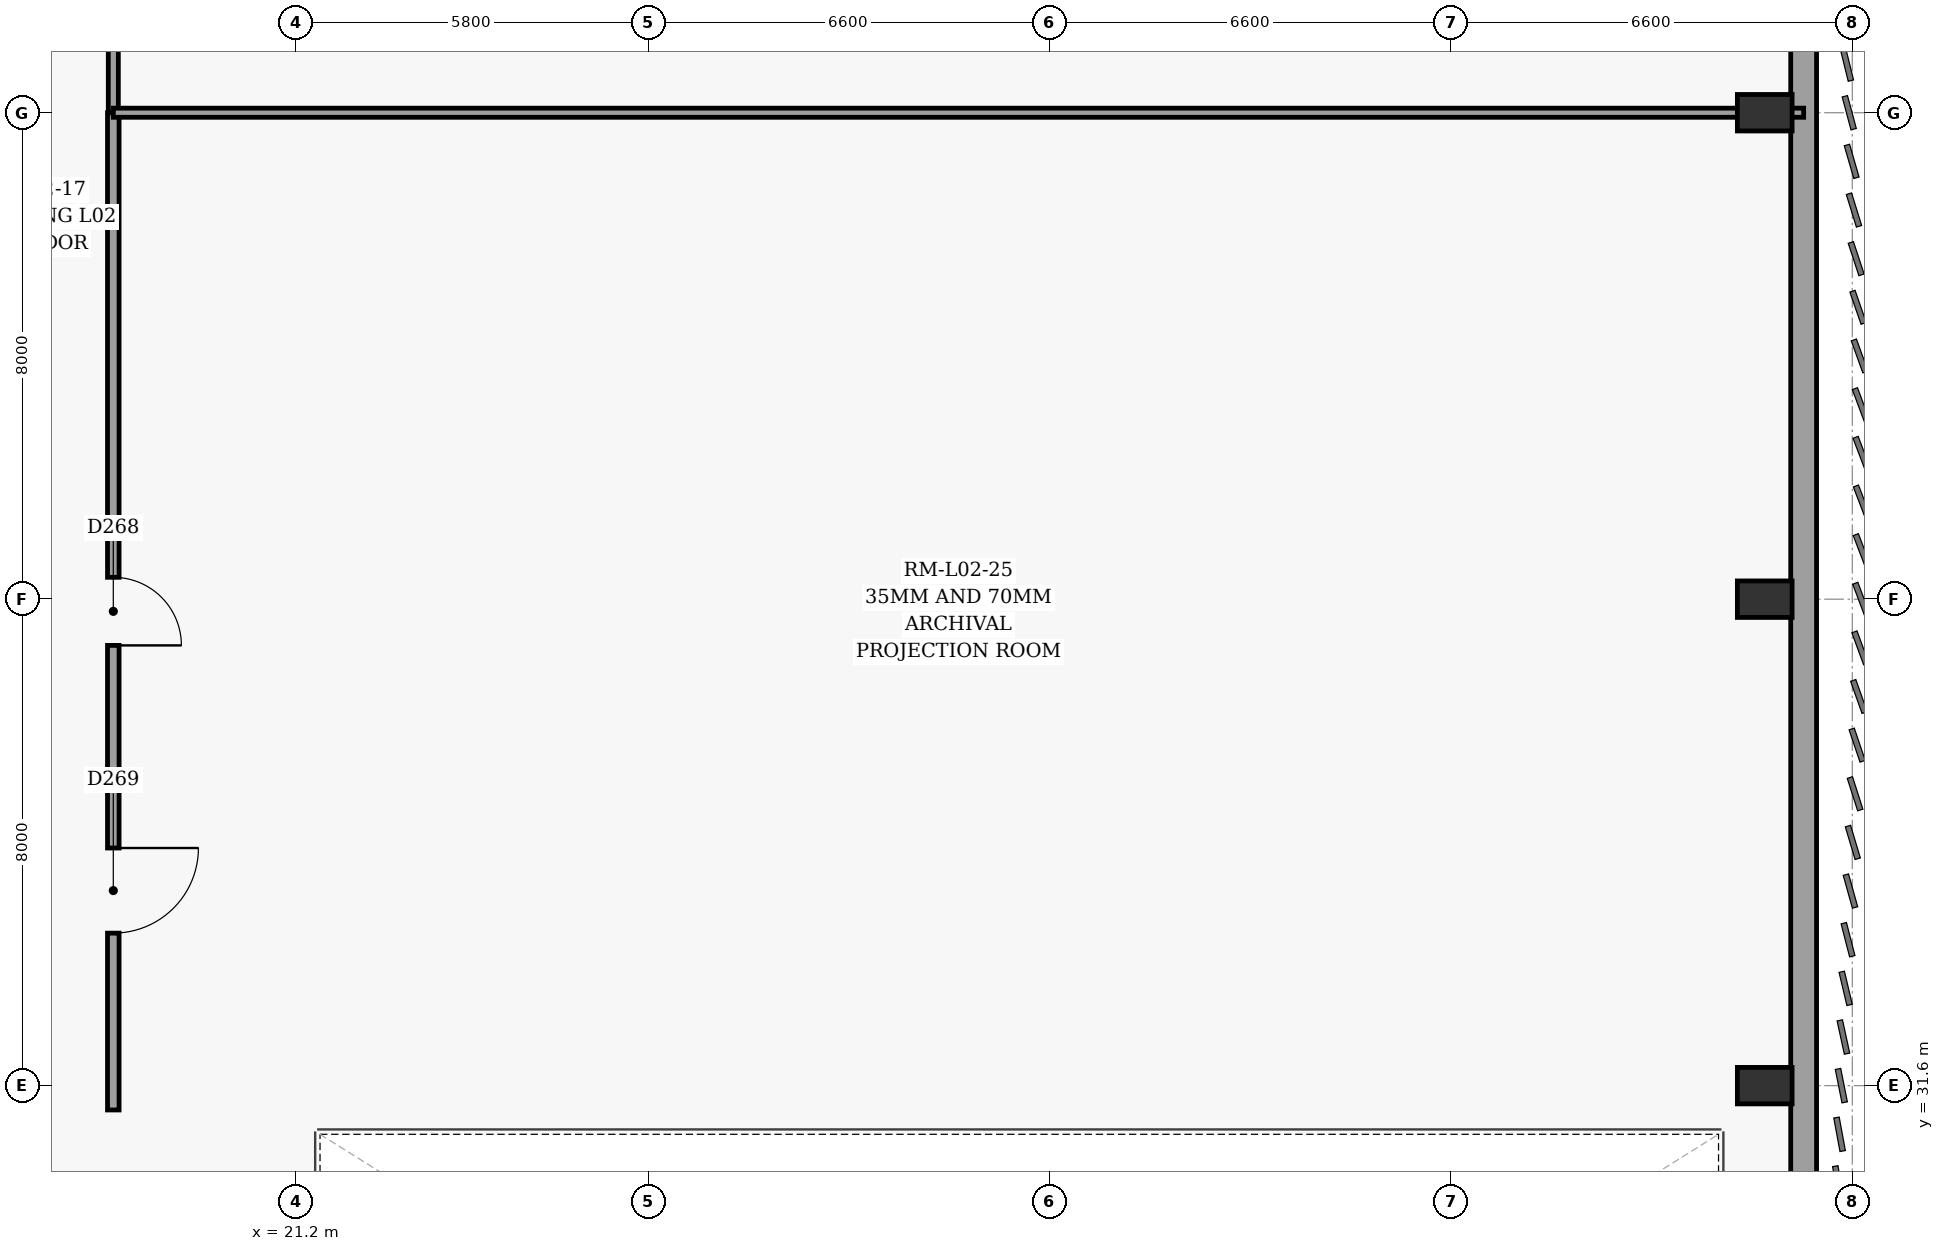
"""IFC4 building model, lengths in metres.
Left out: names, types, materials, properties, quantities, classifications, styles, units other than length and angle.
Written with IfcOpenShell. Run it as: python <this file> out.ifc"""

import sys

from ifc_helpers import new_model, si_unit, direction, frame, frame_2d, origin, origin_2d, place, context, subcontext, project, spatial, rectangle, extrude, element, fill, save


model = new_model("IFC4")
c1 = context("Model", 3, precision=1e-05, world=origin(), true_north=direction((0.0, 1.0)))
c2 = subcontext(c1, "Body", "Model", "MODEL_VIEW")
j1 = project(units=[si_unit("LENGTHUNIT", "METRE"), si_unit("PLANEANGLEUNIT", "RADIAN")], contexts=[c1])
p1 = place(None, origin())
s1 = spatial("IfcSite", under=j1, at=p1, CompositionType="ELEMENT")
p2 = place(p1, origin())
s2 = spatial("IfcBuilding", under=s1, at=p2, CompositionType="ELEMENT")
p3 = place(p2, frame((0.0, 0.0, 10.2)))
s3 = spatial("IfcBuildingStorey", under=s2, at=p3, CompositionType="ELEMENT", Elevation=10.2)
for number, where, z_axis, x_axis in (
    (1, (45.36, 31.6, 0.0), (0.0, 0.0, 1.0), (1.0, 0.0, 0.0)),
    (2, (45.36, 39.6, 0.0), (0.0, 0.0, 1.0), (1.0, 0.0, 0.0)),
    (3, (45.36, 47.6, 0.0), (0.0, 0.0, 1.0), (1.0, 0.0, 0.0)),
):
    element("IfcColumn", number, at=place(p3, frame(where, z_axis=z_axis, x_axis=x_axis)), inside=s3, PredefinedType="COLUMN", context=c2, shape_type="SweptSolid", body=[
        extrude(rectangle(XDim=0.6, YDim=0.9, at=origin_2d()), origin(), (0.0, 0.0, 1.0), 5.4),
    ])
p4 = place(p3, frame((46.0, 63.46, 0.0), z_axis=(0.0, 0.0, 1.0), x_axis=(0.0, -1.0, 0.0)))
e4 = element("IfcWall", 4, at=p4, inside=s3, PredefinedType="SOLIDWALL", context=c2, shape_type="SweptSolid", body=[
    extrude(rectangle(XDim=55.72, YDim=0.425, at=frame_2d((27.86, 0.0))), origin(), (0.0, 0.0, 1.0), 5.16),
])
p5 = place(p3, frame((18.2, 47.6, 0.0), z_axis=(0.0, 0.0, 1.0), x_axis=(0.0, -1.0, 0.0)))
e5 = element("IfcWall", 5, at=p5, inside=s3, PredefinedType="PARTITIONING", context=c2, shape_type="SweptSolid", body=[
    extrude(rectangle(XDim=16.4, YDim=0.19, at=frame_2d((8.2, 0.0))), origin(), (0.0, 0.0, 1.0), 5.16),
])
p6 = place(p5, frame((7.64, 0.0, 0.0)))
e6 = element("IfcOpeningElement", 6, at=p6, cuts=e5, PredefinedType="OPENING", context=c2, shape_type="SweptSolid", body=[
    extrude(rectangle(XDim=1.12, YDim=2.15, at=frame_2d((0.56, 1.075))), frame((0.0, 0.105, 0.0), z_axis=(0.0, -1.0, 0.0), x_axis=(1.0, 0.0, 0.0)), (0.0, 0.0, 1.0), 0.21),
])
p7 = place(p5, frame((12.092, 0.0, 0.0)))
e7 = element("IfcOpeningElement", 7, at=p7, cuts=e5, PredefinedType="OPENING", context=c2, shape_type="SweptSolid", body=[
    extrude(rectangle(XDim=1.4, YDim=2.25, at=frame_2d((0.7, 1.125))), frame((0.0, 0.105, 0.0), z_axis=(0.0, -1.0, 0.0), x_axis=(1.0, 0.0, 0.0)), (0.0, 0.0, 1.0), 0.21),
])
p8 = place(p3, frame((18.2, 63.6, 0.0), z_axis=(0.0, 0.0, 1.0), x_axis=(0.0, -1.0, 0.0)))
e8 = element("IfcWall", 8, at=p8, inside=s3, PredefinedType="PARTITIONING", context=c2, shape_type="SweptSolid", body=[
    extrude(rectangle(XDim=16.0, YDim=0.165, at=frame_2d((8.0, 0.0))), origin(), (0.0, 0.0, 1.0), 5.16),
])
p9 = place(p8, frame((7.41, 0.0, 0.0)))
e9 = element("IfcOpeningElement", 9, at=p9, cuts=e8, PredefinedType="OPENING", context=c2, shape_type="SweptSolid", body=[
    extrude(rectangle(XDim=1.18, YDim=2.15, at=frame_2d((0.59, 1.075))), frame((0.0, 0.093, 0.0), z_axis=(0.0, -1.0, 0.0), x_axis=(1.0, 0.0, 0.0)), (0.0, 0.0, 1.0), 0.185),
])
p10 = place(p8, frame((11.89, 0.0, 0.0)))
e10 = element("IfcOpeningElement", 10, at=p10, cuts=e8, PredefinedType="OPENING", context=c2, shape_type="SweptSolid", body=[
    extrude(rectangle(XDim=1.18, YDim=2.15, at=frame_2d((0.59, 1.075))), frame((0.0, 0.093, 0.0), z_axis=(0.0, -1.0, 0.0), x_axis=(1.0, 0.0, 0.0)), (0.0, 0.0, 1.0), 0.185),
])
p11 = place(p3, frame((18.2, 47.6, 0.0), z_axis=(0.0, 0.0, 1.0), x_axis=(1.0, 0.0, 0.0)))
e11 = element("IfcWall", 11, at=p11, inside=s3, PredefinedType="PARTITIONING", context=c2, shape_type="SweptSolid", body=[
    extrude(rectangle(XDim=27.8, YDim=0.15, at=frame_2d((13.9, 0.0))), origin(), (0.0, 0.0, 1.0), 5.16),
])
p12 = place(p6, origin())
e12 = element("IfcDoor", 12, at=p12, inside=s3, OperationType="SINGLE_SWING_RIGHT", PredefinedType="DOOR", context=c2, shape_type="SweptSolid", body=[
    extrude(rectangle(XDim=1.12, YDim=2.15, at=frame_2d((0.56, 1.075))), frame((0.0, 0.025, 0.0), z_axis=(0.0, -1.0, 0.0), x_axis=(1.0, 0.0, 0.0)), (0.0, 0.0, 1.0), 0.05),
])
fill(e6, e12)
p13 = place(p7, origin())
e13 = element("IfcDoor", 13, at=p13, inside=s3, OperationType="SINGLE_SWING_LEFT", PredefinedType="DOOR", context=c2, shape_type="SweptSolid", body=[
    extrude(rectangle(XDim=1.4, YDim=2.25, at=frame_2d((0.7, 1.125))), frame((0.0, 0.025, 0.0), z_axis=(0.0, -1.0, 0.0), x_axis=(1.0, 0.0, 0.0)), (0.0, 0.0, 1.0), 0.05),
])
fill(e7, e13)
save(model, sys.argv[1])
